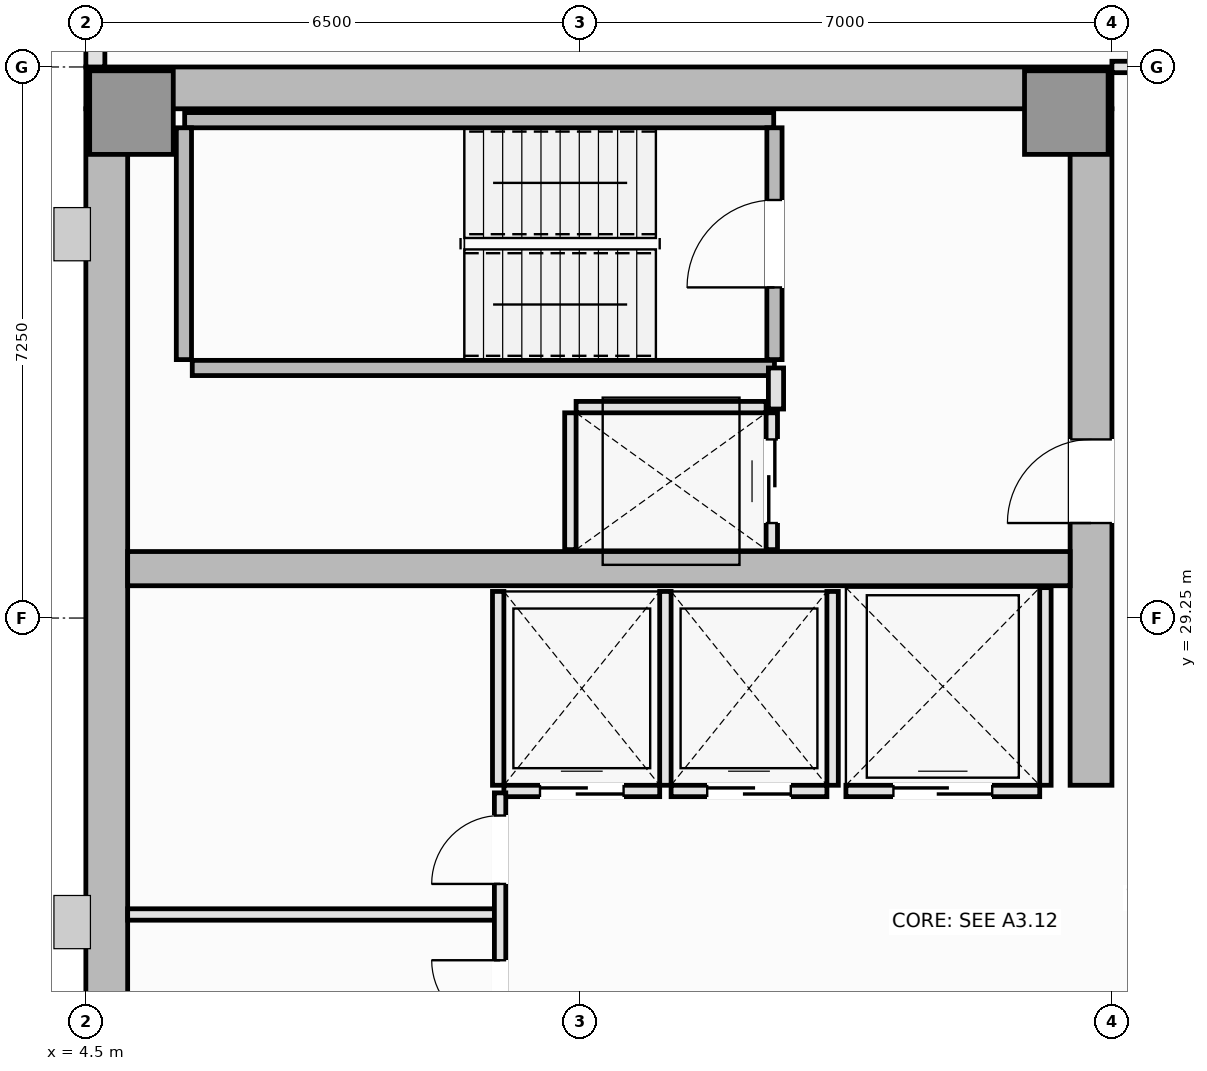
"""IFC4 building model, lengths in metres.
Left out: names, types, materials, properties, quantities, classifications, styles, units other than length and angle.
Written with IfcOpenShell. Run it as: python <this file> out.ifc"""

import sys

from ifc_helpers import new_model, si_unit, direction, frame, frame_2d, origin, origin_2d, place, context, subcontext, project, spatial, rectangle, extrude, element, fill, save


model = new_model("IFC4")
c1 = context("Model", 3, precision=1e-05, world=origin(), true_north=direction((0.0, 1.0)))
c2 = subcontext(c1, "Body", "Model", "MODEL_VIEW")
j1 = project(units=[si_unit("LENGTHUNIT", "METRE"), si_unit("PLANEANGLEUNIT", "RADIAN")], contexts=[c1])
p1 = place(None, origin())
s1 = spatial("IfcSite", under=j1, at=p1, CompositionType="ELEMENT")
p2 = place(p1, origin())
s2 = spatial("IfcBuilding", under=s1, at=p2, CompositionType="ELEMENT")
p3 = place(p2, frame((0.0, 0.0, 212.9)))
s3 = spatial("IfcBuildingStorey", under=s2, at=p3, CompositionType="ELEMENT", Elevation=212.9)
p4 = place(p3, frame((4.5, 36.225, 0.0), z_axis=(0.0, 0.0, 1.0), x_axis=(1.0, 0.0, 0.0)))
e1 = element("IfcWall", 1, at=p4, inside=s3, PredefinedType="SHEAR", context=c2, shape_type="SweptSolid", body=[
    extrude(rectangle(XDim=13.5, YDim=0.55, at=frame_2d((6.75, 0.0))), origin(), (0.0, 0.0, 1.0), 3.55),
])
p5 = place(p3, frame((4.775, 14.55, 0.0), z_axis=(0.0, 0.0, 1.0), x_axis=(0.0, 1.0, 0.0)))
e2 = element("IfcWall", 2, at=p5, inside=s3, PredefinedType="SHEAR", context=c2, shape_type="SweptSolid", body=[
    extrude(rectangle(XDim=21.4, YDim=0.55, at=frame_2d((10.7, 0.0))), origin(), (0.0, 0.0, 1.0), 3.55),
])
p6 = place(p3, frame((17.725, 27.05, 0.0), z_axis=(0.0, 0.0, 1.0), x_axis=(0.0, 1.0, 0.0)))
e3 = element("IfcWall", 3, at=p6, inside=s3, PredefinedType="SHEAR", context=c2, shape_type="SweptSolid", body=[
    extrude(rectangle(XDim=8.9, YDim=0.55, at=frame_2d((4.45, 0.0))), origin(), (0.0, 0.0, 1.0), 3.55),
])
p7 = place(p6, frame((3.45, 0.0, 0.0)))
e4 = element("IfcOpeningElement", 4, at=p7, cuts=e3, PredefinedType="OPENING", context=c2, shape_type="SweptSolid", body=[
    extrude(rectangle(XDim=1.1, YDim=2.15, at=frame_2d((0.55, 1.075))), frame((0.0, 0.285, 0.0), z_axis=(0.0, -1.0, 0.0), x_axis=(1.0, 0.0, 0.0)), (0.0, 0.0, 1.0), 0.57),
])
p8 = place(p3, frame((5.05, 29.9, 0.0), z_axis=(0.0, 0.0, 1.0), x_axis=(1.0, 0.0, 0.0)))
e5 = element("IfcWall", 5, at=p8, inside=s3, PredefinedType="SHEAR", context=c2, shape_type="SweptSolid", body=[
    extrude(rectangle(XDim=12.4, YDim=0.45, at=frame_2d((6.2, 0.0))), origin(), (0.0, 0.0, 1.0), 3.55),
])
for number, where, z_axis, x_axis in (
    (6, (5.1, 35.9, 0.0), (0.0, 0.0, 1.0), (1.0, 0.0, 0.0)),
    (7, (17.4, 35.9, 0.0), (0.0, 0.0, 1.0), (1.0, 0.0, 0.0)),
):
    element("IfcColumn", number, at=place(p3, frame(where, z_axis=z_axis, x_axis=x_axis)), inside=s3, PredefinedType="PILASTER", context=c2, shape_type="SweptSolid", body=[
        extrude(rectangle(XDim=1.1, YDim=1.1, at=origin_2d()), origin(), (0.0, 0.0, 1.0), 3.55),
    ])
p9 = place(p3, frame((4.625, 40.5, 0.0), z_axis=(0.0, 0.0, 1.0), x_axis=(0.0, -1.0, 0.0)))
e8 = element("IfcWall", 8, at=p9, inside=s3, PredefinedType="SOLIDWALL", context=c2, shape_type="SweptSolid", body=[
    extrude(rectangle(XDim=4.0, YDim=0.25, at=frame_2d((2.0, 0.0))), origin(), (0.0, 0.0, 1.0), 3.37),
])
p10 = place(p9, frame((0.9, 0.0, 0.9)))
e9 = element("IfcOpeningElement", 9, at=p10, cuts=e8, PredefinedType="OPENING", context=c2, shape_type="SweptSolid", body=[
    extrude(rectangle(XDim=2.2, YDim=1.8, at=frame_2d((1.1, 0.9))), frame((0.0, 0.135, 0.0), z_axis=(0.0, -1.0, 0.0), x_axis=(1.0, 0.0, 0.0)), (0.0, 0.0, 1.0), 0.27),
])
p11 = place(p3, frame((5.8, 35.8, 0.0), z_axis=(0.0, 0.0, 1.0), x_axis=(1.0, 0.0, 0.0)))
e10 = element("IfcWall", 10, at=p11, inside=s3, PredefinedType="SOLIDWALL", context=c2, shape_type="SweptSolid", body=[
    extrude(rectangle(XDim=7.75, YDim=0.2, at=frame_2d((3.875, 0.0))), origin(), (0.0, 0.0, 1.0), 3.55),
])
p12 = place(p3, frame((5.79, 32.65, 0.0), z_axis=(0.0, 0.0, 1.0), x_axis=(0.0, 1.0, 0.0)))
e11 = element("IfcWall", 11, at=p12, inside=s3, PredefinedType="SOLIDWALL", context=c2, shape_type="SweptSolid", body=[
    extrude(rectangle(XDim=3.05, YDim=0.2, at=frame_2d((1.525, 0.0))), origin(), (0.0, 0.0, 1.0), 3.55),
])
p13 = place(p3, frame((5.9, 32.54, 0.0), z_axis=(0.0, 0.0, 1.0), x_axis=(1.0, 0.0, 0.0)))
e12 = element("IfcWall", 12, at=p13, inside=s3, PredefinedType="SOLIDWALL", context=c2, shape_type="SweptSolid", body=[
    extrude(rectangle(XDim=7.66, YDim=0.2, at=frame_2d((3.83, 0.0))), origin(), (0.0, 0.0, 1.0), 3.55),
])
p14 = place(p3, frame((13.56, 32.65, 0.0), z_axis=(0.0, 0.0, 1.0), x_axis=(0.0, 1.0, 0.0)))
e13 = element("IfcWall", 13, at=p14, inside=s3, PredefinedType="SOLIDWALL", context=c2, shape_type="SweptSolid", body=[
    extrude(rectangle(XDim=3.05, YDim=0.2, at=frame_2d((1.525, 0.0))), origin(), (0.0, 0.0, 1.0), 3.55),
])
p15 = place(p14, frame((0.95, 0.0, 0.0)))
e14 = element("IfcOpeningElement", 14, at=p15, cuts=e13, PredefinedType="OPENING", context=c2, shape_type="SweptSolid", body=[
    extrude(rectangle(XDim=1.15, YDim=2.15, at=frame_2d((0.575, 1.075))), frame((0.0, 0.11, 0.0), z_axis=(0.0, -1.0, 0.0), x_axis=(1.0, 0.0, 0.0)), (0.0, 0.0, 1.0), 0.22),
])
p16 = place(p3, frame((10.0, 26.975, 0.0), z_axis=(0.0, 0.0, 1.0), x_axis=(1.0, 0.0, 0.0)))
e15 = element("IfcWall", 15, at=p16, inside=s3, PredefinedType="PARTITIONING", context=c2, shape_type="SweptSolid", body=[
    extrude(rectangle(XDim=2.05, YDim=0.15, at=frame_2d((1.025, 0.0))), origin(), (0.0, 0.0, 1.0), 3.37),
])
p17 = place(p16, frame((0.475, 0.0, 0.0)))
e16 = element("IfcOpeningElement", 16, at=p17, cuts=e15, PredefinedType="OPENING", context=c2, shape_type="SweptSolid", body=[
    extrude(rectangle(XDim=1.1, YDim=2.2, at=frame_2d((0.55, 1.1))), frame((0.0, 0.085, 0.0), z_axis=(0.0, -1.0, 0.0), x_axis=(1.0, 0.0, 0.0)), (0.0, 0.0, 1.0), 0.17),
])
for number, where, z_axis, x_axis in (
    (17, (9.925, 27.05, 0.0), (0.0, 0.0, 1.0), (0.0, 1.0, 0.0)),
    (18, (12.125, 27.05, 0.0), (0.0, 0.0, 1.0), (0.0, 1.0, 0.0)),
):
    element("IfcWall", number, at=place(p3, frame(where, z_axis=z_axis, x_axis=x_axis)), inside=s3, PredefinedType="PARTITIONING", context=c2, shape_type="SweptSolid", body=[
        extrude(rectangle(XDim=2.55, YDim=0.15, at=frame_2d((1.275, 0.0))), origin(), (0.0, 0.0, 1.0), 3.37),
    ])
p18 = place(p3, frame((12.2, 26.975, 0.0), z_axis=(0.0, 0.0, 1.0), x_axis=(1.0, 0.0, 0.0)))
e19 = element("IfcWall", 19, at=p18, inside=s3, PredefinedType="PARTITIONING", context=c2, shape_type="SweptSolid", body=[
    extrude(rectangle(XDim=2.05, YDim=0.15, at=frame_2d((1.025, 0.0))), origin(), (0.0, 0.0, 1.0), 3.37),
])
p19 = place(p18, frame((0.475, 0.0, 0.0)))
e20 = element("IfcOpeningElement", 20, at=p19, cuts=e19, PredefinedType="OPENING", context=c2, shape_type="SweptSolid", body=[
    extrude(rectangle(XDim=1.1, YDim=2.2, at=frame_2d((0.55, 1.1))), frame((0.0, 0.085, 0.0), z_axis=(0.0, -1.0, 0.0), x_axis=(1.0, 0.0, 0.0)), (0.0, 0.0, 1.0), 0.17),
])
p20 = place(p3, frame((14.325, 27.05, 0.0), z_axis=(0.0, 0.0, 1.0), x_axis=(0.0, 1.0, 0.0)))
e21 = element("IfcWall", 21, at=p20, inside=s3, PredefinedType="PARTITIONING", context=c2, shape_type="SweptSolid", body=[
    extrude(rectangle(XDim=2.55, YDim=0.15, at=frame_2d((1.275, 0.0))), origin(), (0.0, 0.0, 1.0), 3.37),
])
p21 = place(p3, frame((14.5, 26.975, 0.0), z_axis=(0.0, 0.0, 1.0), x_axis=(1.0, 0.0, 0.0)))
e22 = element("IfcWall", 22, at=p21, inside=s3, PredefinedType="PARTITIONING", context=c2, shape_type="SweptSolid", body=[
    extrude(rectangle(XDim=2.55, YDim=0.15, at=frame_2d((1.275, 0.0))), origin(), (0.0, 0.0, 1.0), 3.37),
])
p22 = place(p21, frame((0.625, 0.0, 0.0)))
e23 = element("IfcOpeningElement", 23, at=p22, cuts=e22, PredefinedType="OPENING", context=c2, shape_type="SweptSolid", body=[
    extrude(rectangle(XDim=1.3, YDim=2.2, at=frame_2d((0.65, 1.1))), frame((0.0, 0.085, 0.0), z_axis=(0.0, -1.0, 0.0), x_axis=(1.0, 0.0, 0.0)), (0.0, 0.0, 1.0), 0.17),
])
p23 = place(p3, frame((17.125, 27.05, 0.0), z_axis=(0.0, 0.0, 1.0), x_axis=(0.0, 1.0, 0.0)))
e24 = element("IfcWall", 24, at=p23, inside=s3, PredefinedType="PARTITIONING", context=c2, shape_type="SweptSolid", body=[
    extrude(rectangle(XDim=2.6, YDim=0.15, at=frame_2d((1.3, 0.0))), origin(), (0.0, 0.0, 1.0), 3.37),
])
p24 = place(p3, frame((10.95, 32.025, 0.0), z_axis=(0.0, 0.0, 1.0), x_axis=(1.0, 0.0, 0.0)))
e25 = element("IfcWall", 25, at=p24, inside=s3, PredefinedType="PARTITIONING", context=c2, shape_type="SweptSolid", body=[
    extrude(rectangle(XDim=2.5, YDim=0.15, at=frame_2d((1.25, 0.0))), origin(), (0.0, 0.0, 1.0), 3.37),
])
p25 = place(p3, frame((10.875, 30.15, 0.0), z_axis=(0.0, 0.0, 1.0), x_axis=(0.0, 1.0, 0.0)))
e26 = element("IfcWall", 26, at=p25, inside=s3, PredefinedType="PARTITIONING", context=c2, shape_type="SweptSolid", body=[
    extrude(rectangle(XDim=1.8, YDim=0.15, at=frame_2d((0.9, 0.0))), origin(), (0.0, 0.0, 1.0), 3.37),
])
p26 = place(p3, frame((13.525, 30.15, 0.0), z_axis=(0.0, 0.0, 1.0), x_axis=(0.0, 1.0, 0.0)))
e27 = element("IfcWall", 27, at=p26, inside=s3, PredefinedType="PARTITIONING", context=c2, shape_type="SweptSolid", body=[
    extrude(rectangle(XDim=1.8, YDim=0.15, at=frame_2d((0.9, 0.0))), origin(), (0.0, 0.0, 1.0), 3.37),
])
p27 = place(p26, frame((0.35, 0.0, 0.0)))
e28 = element("IfcOpeningElement", 28, at=p27, cuts=e27, PredefinedType="OPENING", context=c2, shape_type="SweptSolid", body=[
    extrude(rectangle(XDim=1.1, YDim=2.2, at=frame_2d((0.55, 1.1))), frame((0.0, 0.085, 0.0), z_axis=(0.0, -1.0, 0.0), x_axis=(1.0, 0.0, 0.0)), (0.0, 0.0, 1.0), 0.17),
])
p28 = place(p3, frame((13.58, 32.0, 0.0), z_axis=(0.0, 0.0, 1.0), x_axis=(0.0, 1.0, 0.0)))
e29 = element("IfcWall", 29, at=p28, inside=s3, PredefinedType="PARTITIONING", context=c2, shape_type="SweptSolid", body=[
    extrude(rectangle(XDim=0.54, YDim=0.2, at=frame_2d((0.27, 0.0))), origin(), (0.0, 0.0, 1.0), 3.37),
])
p29 = place(p3, frame((5.05, 25.35, 0.0), z_axis=(0.0, 0.0, 1.0), x_axis=(1.0, 0.0, 0.0)))
e30 = element("IfcWall", 30, at=p29, inside=s3, PredefinedType="PARTITIONING", context=c2, shape_type="SweptSolid", body=[
    extrude(rectangle(XDim=4.9, YDim=0.15, at=frame_2d((2.45, 0.0))), origin(), (0.0, 0.0, 1.0), 3.37),
])
p30 = place(p3, frame((9.95, 23.55, 0.0), z_axis=(0.0, 0.0, 1.0), x_axis=(0.0, 1.0, 0.0)))
e31 = element("IfcWall", 31, at=p30, inside=s3, PredefinedType="PARTITIONING", context=c2, shape_type="SweptSolid", body=[
    extrude(rectangle(XDim=3.4, YDim=0.15, at=frame_2d((1.7, 0.0))), origin(), (0.0, 0.0, 1.0), 3.37),
])
p31 = place(p30, frame((0.298, 0.0, 0.0)))
e32 = element("IfcOpeningElement", 32, at=p31, cuts=e31, PredefinedType="OPENING", context=c2, shape_type="SweptSolid", body=[
    extrude(rectangle(XDim=0.9, YDim=2.1, at=frame_2d((0.45, 1.05))), frame((0.0, 0.085, 0.0), z_axis=(0.0, -1.0, 0.0), x_axis=(1.0, 0.0, 0.0)), (0.0, 0.0, 1.0), 0.17),
])
p32 = place(p30, frame((2.202, 0.0, 0.0)))
e33 = element("IfcOpeningElement", 33, at=p32, cuts=e31, PredefinedType="OPENING", context=c2, shape_type="SweptSolid", body=[
    extrude(rectangle(XDim=0.9, YDim=2.1, at=frame_2d((0.45, 1.05))), frame((0.0, 0.085, 0.0), z_axis=(0.0, -1.0, 0.0), x_axis=(1.0, 0.0, 0.0)), (0.0, 0.0, 1.0), 0.17),
])
p33 = place(p3, frame((18.0, 36.5, 0.0), z_axis=(0.0, 0.0, 1.0), x_axis=(1.0, 0.0, 0.0)))
e34 = element("IfcWall", 34, at=p33, inside=s3, PredefinedType="PARTITIONING", context=c2, shape_type="SweptSolid", body=[
    extrude(rectangle(XDim=1.9, YDim=0.15, at=frame_2d((0.95, 0.0))), origin(), (0.0, 0.0, 1.0), 3.37),
])
p34 = place(p33, frame((0.5, 0.0, 0.0)))
e35 = element("IfcOpeningElement", 35, at=p34, cuts=e34, PredefinedType="OPENING", context=c2, shape_type="SweptSolid", body=[
    extrude(rectangle(XDim=0.9, YDim=2.1, at=frame_2d((0.45, 1.05))), frame((0.0, 0.085, 0.0), z_axis=(0.0, -1.0, 0.0), x_axis=(1.0, 0.0, 0.0)), (0.0, 0.0, 1.0), 0.17),
])
p35 = place(p15, origin())
e36 = element("IfcDoor", 36, at=p35, inside=s3, OperationType="SINGLE_SWING_LEFT", PredefinedType="DOOR", context=c2, shape_type="SweptSolid", body=[
    extrude(rectangle(XDim=1.15, YDim=2.15, at=frame_2d((0.575, 1.075))), frame((0.0, 0.025, 0.0), z_axis=(0.0, -1.0, 0.0), x_axis=(1.0, 0.0, 0.0)), (0.0, 0.0, 1.0), 0.05),
])
fill(e14, e36)
p36 = place(p17, origin())
e37 = element("IfcDoor", 37, at=p36, inside=s3, OperationType="DOUBLE_DOOR_SLIDING", PredefinedType="DOOR", context=c2, shape_type="SweptSolid", body=[
    extrude(rectangle(XDim=1.1, YDim=2.2, at=frame_2d((0.55, 1.1))), frame((0.0, 0.025, 0.0), z_axis=(0.0, -1.0, 0.0), x_axis=(1.0, 0.0, 0.0)), (0.0, 0.0, 1.0), 0.05),
])
fill(e16, e37)
p37 = place(p19, origin())
e38 = element("IfcDoor", 38, at=p37, inside=s3, OperationType="DOUBLE_DOOR_SLIDING", PredefinedType="DOOR", context=c2, shape_type="SweptSolid", body=[
    extrude(rectangle(XDim=1.1, YDim=2.2, at=frame_2d((0.55, 1.1))), frame((0.0, 0.025, 0.0), z_axis=(0.0, -1.0, 0.0), x_axis=(1.0, 0.0, 0.0)), (0.0, 0.0, 1.0), 0.05),
])
fill(e20, e38)
p38 = place(p22, origin())
e39 = element("IfcDoor", 39, at=p38, inside=s3, OperationType="DOUBLE_DOOR_SLIDING", PredefinedType="DOOR", context=c2, shape_type="SweptSolid", body=[
    extrude(rectangle(XDim=1.3, YDim=2.2, at=frame_2d((0.65, 1.1))), frame((0.0, 0.025, 0.0), z_axis=(0.0, -1.0, 0.0), x_axis=(1.0, 0.0, 0.0)), (0.0, 0.0, 1.0), 0.05),
])
fill(e23, e39)
p39 = place(p27, origin())
e40 = element("IfcDoor", 40, at=p39, inside=s3, OperationType="DOUBLE_DOOR_SLIDING", PredefinedType="DOOR", context=c2, shape_type="SweptSolid", body=[
    extrude(rectangle(XDim=1.1, YDim=2.2, at=frame_2d((0.55, 1.1))), frame((0.0, 0.025, 0.0), z_axis=(0.0, -1.0, 0.0), x_axis=(1.0, 0.0, 0.0)), (0.0, 0.0, 1.0), 0.05),
])
fill(e28, e40)
p40 = place(p7, origin())
e41 = element("IfcDoor", 41, at=p40, inside=s3, OperationType="SINGLE_SWING_LEFT", PredefinedType="DOOR", context=c2, shape_type="SweptSolid", body=[
    extrude(rectangle(XDim=1.1, YDim=2.15, at=frame_2d((0.55, 1.075))), frame((0.0, 0.025, 0.0), z_axis=(0.0, -1.0, 0.0), x_axis=(1.0, 0.0, 0.0)), (0.0, 0.0, 1.0), 0.05),
])
fill(e4, e41)
p41 = place(p31, origin())
e42 = element("IfcDoor", 42, at=p41, inside=s3, OperationType="SINGLE_SWING_RIGHT", PredefinedType="DOOR", context=c2, shape_type="SweptSolid", body=[
    extrude(rectangle(XDim=0.9, YDim=2.1, at=frame_2d((0.45, 1.05))), frame((0.0, 0.025, 0.0), z_axis=(0.0, -1.0, 0.0), x_axis=(1.0, 0.0, 0.0)), (0.0, 0.0, 1.0), 0.05),
])
fill(e32, e42)
p42 = place(p32, origin())
e43 = element("IfcDoor", 43, at=p42, inside=s3, OperationType="SINGLE_SWING_LEFT", PredefinedType="DOOR", context=c2, shape_type="SweptSolid", body=[
    extrude(rectangle(XDim=0.9, YDim=2.1, at=frame_2d((0.45, 1.05))), frame((0.0, 0.025, 0.0), z_axis=(0.0, -1.0, 0.0), x_axis=(1.0, 0.0, 0.0)), (0.0, 0.0, 1.0), 0.05),
])
fill(e33, e43)
save(model, sys.argv[1])
